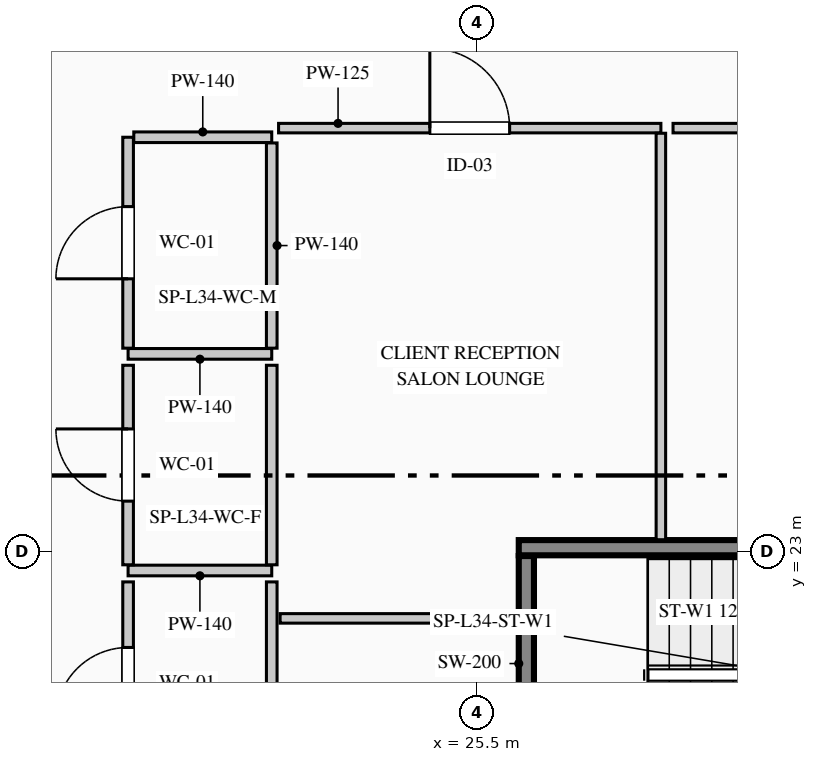
"""IFC4 building model, lengths in metres.
Left out: names, types, materials, properties, quantities, classifications, styles, units other than length and angle.
Written with IfcOpenShell. Run it as: python <this file> out.ifc"""

import sys

from ifc_helpers import new_model, si_unit, direction, frame, frame_2d, origin, place, context, subcontext, project, spatial, rectangle, extrude, element, fill, save


model = new_model("IFC4")
c1 = context("Model", 3, precision=1e-05, world=origin(), true_north=direction((0.0, 1.0)))
c2 = subcontext(c1, "Body", "Model", "MODEL_VIEW")
j1 = project(units=[si_unit("LENGTHUNIT", "METRE"), si_unit("PLANEANGLEUNIT", "RADIAN")], contexts=[c1])
p1 = place(None, origin())
s1 = spatial("IfcSite", under=j1, at=p1, CompositionType="ELEMENT")
p2 = place(p1, origin())
s2 = spatial("IfcBuilding", under=s1, at=p2, CompositionType="ELEMENT")
p3 = place(p2, frame((0.0, 0.0, 146.95)))
s3 = spatial("IfcBuildingStorey", under=s2, at=p3, CompositionType="ELEMENT", Elevation=146.95)
p4 = place(p3, frame((26.05, 23.05, 0.0), z_axis=(0.0, 0.0, 1.0), x_axis=(1.0, 0.0, 0.0)))
e1 = element("IfcWall", 1, at=p4, inside=s3, PredefinedType="SHEAR", context=c2, shape_type="SweptSolid", body=[
    extrude(rectangle(XDim=7.2, YDim=0.2, at=frame_2d((3.6, 0.0))), origin(), (0.0, 0.0, 1.0), 3.95),
])
p5 = place(p3, frame((26.15, 19.81, 0.0), z_axis=(0.0, 0.0, 1.0), x_axis=(0.0, 1.0, 0.0)))
e2 = element("IfcWall", 2, at=p5, inside=s3, PredefinedType="SHEAR", context=c2, shape_type="SweptSolid", body=[
    extrude(rectangle(XDim=3.13, YDim=0.2, at=frame_2d((1.565, 0.0))), origin(), (0.0, 0.0, 1.0), 3.95),
])
p6 = place(p3, frame((22.8, 25.6, 0.0), z_axis=(0.0, 0.0, 1.0), x_axis=(-1.0, 0.0, 0.0)))
e3 = element("IfcWall", 3, at=p6, inside=s3, PredefinedType="PARTITIONING", context=c2, shape_type="SweptSolid", body=[
    extrude(rectangle(XDim=1.89, YDim=0.14, at=frame_2d((0.945, 0.0))), origin(), (0.0, 0.0, 1.0), 3.69),
])
p7 = place(p3, frame((20.91, 25.675, 0.0), z_axis=(0.0, 0.0, 1.0), x_axis=(0.0, 1.0, 0.0)))
e4 = element("IfcWall", 4, at=p7, inside=s3, PredefinedType="PARTITIONING", context=c2, shape_type="SweptSolid", body=[
    extrude(rectangle(XDim=2.775, YDim=0.14, at=frame_2d((1.387, 0.0))), origin(), (0.0, 0.0, 1.0), 3.69),
])
p8 = place(p7, frame((0.913, 0.0, 0.0)))
e5 = element("IfcOpeningElement", 5, at=p8, cuts=e4, PredefinedType="OPENING", context=c2, shape_type="SweptSolid", body=[
    extrude(rectangle(XDim=0.95, YDim=2.15, at=frame_2d((0.475, 1.075))), frame((0.0, 0.08, 0.0), z_axis=(0.0, -1.0, 0.0), x_axis=(1.0, 0.0, 0.0)), (0.0, 0.0, 1.0), 0.16),
])
p9 = place(p3, frame((20.985, 28.45, 0.0), z_axis=(0.0, 0.0, 1.0), x_axis=(1.0, 0.0, 0.0)))
e6 = element("IfcWall", 6, at=p9, inside=s3, PredefinedType="PARTITIONING", context=c2, shape_type="SweptSolid", body=[
    extrude(rectangle(XDim=1.815, YDim=0.14, at=frame_2d((0.907, 0.0))), origin(), (0.0, 0.0, 1.0), 3.69),
])
p10 = place(p3, frame((22.8, 28.375, 0.0), z_axis=(0.0, 0.0, 1.0), x_axis=(0.0, -1.0, 0.0)))
e7 = element("IfcWall", 7, at=p10, inside=s3, PredefinedType="PARTITIONING", context=c2, shape_type="SweptSolid", body=[
    extrude(rectangle(XDim=2.7, YDim=0.14, at=frame_2d((1.35, 0.0))), origin(), (0.0, 0.0, 1.0), 3.315),
])
p11 = place(p3, frame((22.8, 22.75, 0.0), z_axis=(0.0, 0.0, 1.0), x_axis=(-1.0, 0.0, 0.0)))
e8 = element("IfcWall", 8, at=p11, inside=s3, PredefinedType="PARTITIONING", context=c2, shape_type="SweptSolid", body=[
    extrude(rectangle(XDim=1.89, YDim=0.14, at=frame_2d((0.945, 0.0))), origin(), (0.0, 0.0, 1.0), 3.69),
])
p12 = place(p3, frame((20.91, 22.825, 0.0), z_axis=(0.0, 0.0, 1.0), x_axis=(0.0, 1.0, 0.0)))
e9 = element("IfcWall", 9, at=p12, inside=s3, PredefinedType="PARTITIONING", context=c2, shape_type="SweptSolid", body=[
    extrude(rectangle(XDim=2.625, YDim=0.14, at=frame_2d((1.312, 0.0))), origin(), (0.0, 0.0, 1.0), 3.69),
])
p13 = place(p12, frame((0.837, 0.0, 0.0)))
e10 = element("IfcOpeningElement", 10, at=p13, cuts=e9, PredefinedType="OPENING", context=c2, shape_type="SweptSolid", body=[
    extrude(rectangle(XDim=0.95, YDim=2.15, at=frame_2d((0.475, 1.075))), frame((0.0, 0.08, 0.0), z_axis=(0.0, -1.0, 0.0), x_axis=(1.0, 0.0, 0.0)), (0.0, 0.0, 1.0), 0.16),
])
p14 = place(p3, frame((22.8, 25.45, 0.0), z_axis=(0.0, 0.0, 1.0), x_axis=(0.0, -1.0, 0.0)))
e11 = element("IfcWall", 11, at=p14, inside=s3, PredefinedType="PARTITIONING", context=c2, shape_type="SweptSolid", body=[
    extrude(rectangle(XDim=2.625, YDim=0.14, at=frame_2d((1.312, 0.0))), origin(), (0.0, 0.0, 1.0), 3.315),
])
p15 = place(p3, frame((20.91, 19.925, 0.0), z_axis=(0.0, 0.0, 1.0), x_axis=(0.0, 1.0, 0.0)))
e12 = element("IfcWall", 12, at=p15, inside=s3, PredefinedType="PARTITIONING", context=c2, shape_type="SweptSolid", body=[
    extrude(rectangle(XDim=2.675, YDim=0.14, at=frame_2d((1.337, 0.0))), origin(), (0.0, 0.0, 1.0), 3.69),
])
p16 = place(p15, frame((0.863, 0.0, 0.0)))
e13 = element("IfcOpeningElement", 13, at=p16, cuts=e12, PredefinedType="OPENING", context=c2, shape_type="SweptSolid", body=[
    extrude(rectangle(XDim=0.95, YDim=2.15, at=frame_2d((0.475, 1.075))), frame((0.0, 0.08, 0.0), z_axis=(0.0, -1.0, 0.0), x_axis=(1.0, 0.0, 0.0)), (0.0, 0.0, 1.0), 0.16),
])
p17 = place(p3, frame((22.8, 22.6, 0.0), z_axis=(0.0, 0.0, 1.0), x_axis=(0.0, -1.0, 0.0)))
e14 = element("IfcWall", 14, at=p17, inside=s3, PredefinedType="PARTITIONING", context=c2, shape_type="SweptSolid", body=[
    extrude(rectangle(XDim=2.675, YDim=0.14, at=frame_2d((1.337, 0.0))), origin(), (0.0, 0.0, 1.0), 3.315),
])
p18 = place(p3, frame((22.91, 22.12, 0.0), z_axis=(0.0, 0.0, 1.0), x_axis=(1.0, 0.0, 0.0)))
e15 = element("IfcWall", 15, at=p18, inside=s3, PredefinedType="PARTITIONING", context=c2, shape_type="SweptSolid", body=[
    extrude(rectangle(XDim=3.135, YDim=0.125, at=frame_2d((1.567, 0.0))), origin(), (0.0, 0.0, 1.0), 3.69),
])
p19 = place(p3, frame((22.89, 28.57, 0.0), z_axis=(0.0, 0.0, 1.0), x_axis=(1.0, 0.0, 0.0)))
e16 = element("IfcWall", 16, at=p19, inside=s3, PredefinedType="PARTITIONING", context=c2, shape_type="SweptSolid", body=[
    extrude(rectangle(XDim=5.03, YDim=0.125, at=frame_2d((2.515, 0.0))), origin(), (0.0, 0.0, 1.0), 3.475),
])
p20 = place(p19, frame((1.99, 0.0, 0.0)))
e17 = element("IfcOpeningElement", 17, at=p20, cuts=e16, PredefinedType="OPENING", context=c2, shape_type="SweptSolid", body=[
    extrude(rectangle(XDim=1.05, YDim=2.15, at=frame_2d((0.525, 1.075))), frame((0.0, 0.073, 0.0), z_axis=(0.0, -1.0, 0.0), x_axis=(1.0, 0.0, 0.0)), (0.0, 0.0, 1.0), 0.145),
])
p21 = place(p3, frame((27.92, 28.502, 0.0), z_axis=(0.0, 0.0, 1.0), x_axis=(0.0, -1.0, 0.0)))
e18 = element("IfcWall", 18, at=p21, inside=s3, PredefinedType="PARTITIONING", context=c2, shape_type="SweptSolid", body=[
    extrude(rectangle(XDim=5.347, YDim=0.125, at=frame_2d((2.674, 0.0))), origin(), (0.0, 0.0, 1.0), 3.69),
])
p22 = place(p3, frame((28.08, 28.57, 0.0), z_axis=(0.0, 0.0, 1.0), x_axis=(1.0, 0.0, 0.0)))
e19 = element("IfcWall", 19, at=p22, inside=s3, PredefinedType="PARTITIONING", context=c2, shape_type="SweptSolid", body=[
    extrude(rectangle(XDim=6.29, YDim=0.125, at=frame_2d((3.145, 0.0))), origin(), (0.0, 0.0, 1.0), 3.475),
])
p23 = place(p22, frame((2.62, 0.0, 0.0)))
e20 = element("IfcOpeningElement", 20, at=p23, cuts=e19, PredefinedType="OPENING", context=c2, shape_type="SweptSolid", body=[
    extrude(rectangle(XDim=1.05, YDim=2.15, at=frame_2d((0.525, 1.075))), frame((0.0, 0.073, 0.0), z_axis=(0.0, -1.0, 0.0), x_axis=(1.0, 0.0, 0.0)), (0.0, 0.0, 1.0), 0.145),
])
p24 = place(p8, origin())
e21 = element("IfcDoor", 21, at=p24, inside=s3, OperationType="SINGLE_SWING_LEFT", PredefinedType="DOOR", context=c2, shape_type="SweptSolid", body=[
    extrude(rectangle(XDim=0.95, YDim=2.15, at=frame_2d((0.475, 1.075))), frame((0.0, 0.025, 0.0), z_axis=(0.0, -1.0, 0.0), x_axis=(1.0, 0.0, 0.0)), (0.0, 0.0, 1.0), 0.05),
])
fill(e5, e21)
p25 = place(p13, origin())
e22 = element("IfcDoor", 22, at=p25, inside=s3, OperationType="SINGLE_SWING_RIGHT", PredefinedType="DOOR", context=c2, shape_type="SweptSolid", body=[
    extrude(rectangle(XDim=0.95, YDim=2.15, at=frame_2d((0.475, 1.075))), frame((0.0, 0.025, 0.0), z_axis=(0.0, -1.0, 0.0), x_axis=(1.0, 0.0, 0.0)), (0.0, 0.0, 1.0), 0.05),
])
fill(e10, e22)
p26 = place(p16, origin())
e23 = element("IfcDoor", 23, at=p26, inside=s3, OperationType="SINGLE_SWING_LEFT", PredefinedType="DOOR", context=c2, shape_type="SweptSolid", body=[
    extrude(rectangle(XDim=0.95, YDim=2.15, at=frame_2d((0.475, 1.075))), frame((0.0, 0.025, 0.0), z_axis=(0.0, -1.0, 0.0), x_axis=(1.0, 0.0, 0.0)), (0.0, 0.0, 1.0), 0.05),
])
fill(e13, e23)
p27 = place(p20, origin())
e24 = element("IfcDoor", 24, at=p27, inside=s3, OperationType="SINGLE_SWING_LEFT", PredefinedType="DOOR", context=c2, shape_type="SweptSolid", body=[
    extrude(rectangle(XDim=1.05, YDim=2.15, at=frame_2d((0.525, 1.075))), frame((0.0, 0.025, 0.0), z_axis=(0.0, -1.0, 0.0), x_axis=(1.0, 0.0, 0.0)), (0.0, 0.0, 1.0), 0.05),
])
fill(e17, e24)
save(model, sys.argv[1])
